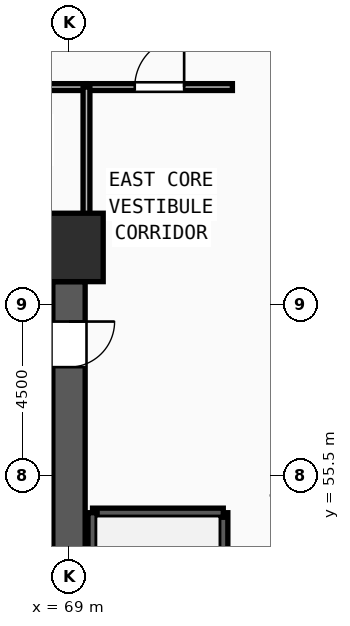
"""IFC4 building model, lengths in metres.
Left out: names, types, materials, properties, quantities, classifications, styles, units other than length and angle.
Written with IfcOpenShell. Run it as: python <this file> out.ifc"""

import sys

from ifc_helpers import new_model, si_unit, direction, frame, frame_2d, origin, origin_2d, place, context, subcontext, project, spatial, rectangle, extrude, source, transform, mapped, element, fill, save


model = new_model("IFC4")
c1 = context("Model", 3, precision=1e-05, world=origin(), true_north=direction((0.0, 1.0)))
c2 = subcontext(c1, "Body", "Model", "MODEL_VIEW")
j1 = project(units=[si_unit("LENGTHUNIT", "METRE"), si_unit("PLANEANGLEUNIT", "RADIAN")], contexts=[c1])
p1 = place(None, origin())
s1 = spatial("IfcSite", under=j1, at=p1, CompositionType="ELEMENT")
p2 = place(p1, origin())
s2 = spatial("IfcBuilding", under=s1, at=p2, CompositionType="ELEMENT")
p3 = place(p2, frame((0.0, 0.0, 23.4)))
s3 = spatial("IfcBuildingStorey", under=s2, at=p3, CompositionType="ELEMENT", Elevation=23.4)
m1 = source(origin(), c2, "Body", "SweptSolid", [
    extrude(rectangle(XDim=1.8, YDim=1.8, at=origin_2d()), origin(), (0.0, 0.0, 1.0), 5.1),
])
p4 = place(p3, frame((69.0, 61.5, 0.0), z_axis=(0.0, 0.0, 1.0), x_axis=(1.0, 0.0, 0.0)))
e1 = element("IfcColumn", 1, at=p4, inside=s3, PredefinedType="COLUMN", context=c2, shape_type="MappedRepresentation", body=[
    mapped(m1, transform((0.0, 0.0, 0.0), x_axis=(1.0, 0.0, 0.0), y_axis=(0.0, 1.0, 0.0), z_axis=(0.0, 0.0, 1.0), scale=1.0)),
])
p5 = place(p3, frame((69.0, 60.6, 0.0), z_axis=(0.0, 0.0, 1.0), x_axis=(0.0, -1.0, 0.0)))
e2 = element("IfcWall", 2, at=p5, inside=s3, PredefinedType="SHEAR", context=c2, shape_type="SweptSolid", body=[
    extrude(rectangle(XDim=13.2, YDim=0.85, at=frame_2d((6.6, 0.0))), origin(), (0.0, 0.0, 1.0), 4.82),
])
m2 = source(origin(), c2, "Body", "SweptSolid", [
    extrude(rectangle(XDim=1.2, YDim=2.2, at=frame_2d((0.6, 1.1))), frame((0.0, 0.435, 0.0), z_axis=(0.0, -1.0, 0.0), x_axis=(1.0, 0.0, 0.0)), (0.0, 0.0, 1.0), 0.87),
])
p6 = place(p5, frame((1.05, 0.0, 0.0)))
e3 = element("IfcOpeningElement", 3, at=p6, cuts=e2, PredefinedType="OPENING", context=c2, shape_type="MappedRepresentation", body=[
    mapped(m2, transform((0.0, 0.0, 0.0), x_axis=(1.0, 0.0, 0.0), y_axis=(0.0, 1.0, 0.0), z_axis=(0.0, 0.0, 1.0), scale=1.0)),
])
p7 = place(p3, frame((73.06, 46.7, 0.0), z_axis=(0.0, 0.0, 1.0), x_axis=(0.0, 1.0, 0.0)))
e4 = element("IfcWall", 4, at=p7, inside=s3, PredefinedType="SOLIDWALL", context=c2, shape_type="SweptSolid", body=[
    extrude(rectangle(XDim=7.82, YDim=0.24, at=frame_2d((3.91, 0.0))), origin(), (0.0, 0.0, 1.0), 4.82),
])
m3 = source(origin(), c2, "Body", "SweptSolid", [
    extrude(rectangle(XDim=1.2, YDim=2.2, at=frame_2d((0.6, 1.1))), frame((0.0, 0.13, 0.0), z_axis=(0.0, -1.0, 0.0), x_axis=(1.0, 0.0, 0.0)), (0.0, 0.0, 1.0), 0.26),
])
p8 = place(p7, frame((0.32, 0.0, 0.0)))
e5 = element("IfcOpeningElement", 5, at=p8, cuts=e4, PredefinedType="OPENING", context=c2, shape_type="MappedRepresentation", body=[
    mapped(m3, transform((0.0, 0.0, 0.0), x_axis=(1.0, 0.0, 0.0), y_axis=(0.0, 1.0, 0.0), z_axis=(0.0, 0.0, 1.0), scale=1.0)),
])
p9 = place(p3, frame((73.06, 54.52, 0.0), z_axis=(0.0, 0.0, 1.0), x_axis=(-1.0, 0.0, 0.0)))
e6 = element("IfcWall", 6, at=p9, inside=s3, PredefinedType="SOLIDWALL", context=c2, shape_type="SweptSolid", body=[
    extrude(rectangle(XDim=3.44, YDim=0.24, at=frame_2d((1.72, 0.0))), origin(), (0.0, 0.0, 1.0), 4.82),
])
p10 = place(p3, frame((69.62, 54.52, 0.0), z_axis=(0.0, 0.0, 1.0), x_axis=(0.0, -1.0, 0.0)))
e7 = element("IfcWall", 7, at=p10, inside=s3, PredefinedType="SOLIDWALL", context=c2, shape_type="SweptSolid", body=[
    extrude(rectangle(XDim=7.82, YDim=0.24, at=frame_2d((3.91, 0.0))), origin(), (0.0, 0.0, 1.0), 4.82),
])
p11 = place(p3, frame((65.92, 65.72, 0.0), z_axis=(0.0, 0.0, 1.0), x_axis=(1.0, 0.0, 0.0)))
e8 = element("IfcWall", 8, at=p11, inside=s3, PredefinedType="PARTITIONING", context=c2, shape_type="SweptSolid", body=[
    extrude(rectangle(XDim=3.54, YDim=0.18, at=frame_2d((1.77, 0.0))), origin(), (0.0, 0.0, 1.0), 4.82),
])
m4 = source(origin(), c2, "Body", "SweptSolid", [
    extrude(rectangle(XDim=1.0, YDim=2.2, at=frame_2d((0.5, 1.1))), frame((0.0, 0.1, 0.0), z_axis=(0.0, -1.0, 0.0), x_axis=(1.0, 0.0, 0.0)), (0.0, 0.0, 1.0), 0.2),
])
p12 = place(p11, frame((1.27, 0.0, 0.0)))
e9 = element("IfcOpeningElement", 9, at=p12, cuts=e8, PredefinedType="OPENING", context=c2, shape_type="MappedRepresentation", body=[
    mapped(m4, transform((0.0, 0.0, 0.0), x_axis=(1.0, 0.0, 0.0), y_axis=(0.0, 1.0, 0.0), z_axis=(0.0, 0.0, 1.0), scale=1.0)),
])
p13 = place(p3, frame((69.46, 65.72, 0.0), z_axis=(0.0, 0.0, 1.0), x_axis=(1.0, 0.0, 0.0)))
e10 = element("IfcWall", 10, at=p13, inside=s3, PredefinedType="PARTITIONING", context=c2, shape_type="SweptSolid", body=[
    extrude(rectangle(XDim=3.84, YDim=0.18, at=frame_2d((1.92, 0.0))), origin(), (0.0, 0.0, 1.0), 4.82),
])
m5 = source(origin(), c2, "Body", "SweptSolid", [
    extrude(rectangle(XDim=1.3, YDim=2.2, at=frame_2d((0.65, 1.1))), frame((0.0, 0.1, 0.0), z_axis=(0.0, -1.0, 0.0), x_axis=(1.0, 0.0, 0.0)), (0.0, 0.0, 1.0), 0.2),
])
p14 = place(p13, frame((1.27, 0.0, 0.0)))
e11 = element("IfcOpeningElement", 11, at=p14, cuts=e10, PredefinedType="OPENING", context=c2, shape_type="MappedRepresentation", body=[
    mapped(m5, transform((0.0, 0.0, 0.0), x_axis=(1.0, 0.0, 0.0), y_axis=(0.0, 1.0, 0.0), z_axis=(0.0, 0.0, 1.0), scale=1.0)),
])
p15 = place(p3, frame((69.46, 61.95, 0.0), z_axis=(0.0, 0.0, 1.0), x_axis=(0.0, 1.0, 0.0)))
e12 = element("IfcWall", 12, at=p15, inside=s3, PredefinedType="PARTITIONING", context=c2, shape_type="SweptSolid", body=[
    extrude(rectangle(XDim=3.77, YDim=0.18, at=frame_2d((1.885, 0.0))), origin(), (0.0, 0.0, 1.0), 3.335),
])
m6 = source(origin(), c2, "Body", "SweptSolid", [
    extrude(rectangle(XDim=1.2, YDim=2.2, at=frame_2d((0.6, 1.1))), frame((0.0, 0.025, 0.0), z_axis=(0.0, -1.0, 0.0), x_axis=(1.0, 0.0, 0.0)), (0.0, 0.0, 1.0), 0.05),
])
p16 = place(p6, origin())
e13 = element("IfcDoor", 13, at=p16, inside=s3, OperationType="SINGLE_SWING_LEFT", PredefinedType="DOOR", context=c2, shape_type="MappedRepresentation", body=[
    mapped(m6, transform((0.0, 0.0, 0.0), x_axis=(1.0, 0.0, 0.0), y_axis=(0.0, 1.0, 0.0), z_axis=(0.0, 0.0, 1.0), scale=1.0)),
])
fill(e3, e13)
m7 = source(origin(), c2, "Body", "SweptSolid", [
    extrude(rectangle(XDim=1.3, YDim=2.2, at=frame_2d((0.65, 1.1))), frame((0.0, 0.025, 0.0), z_axis=(0.0, -1.0, 0.0), x_axis=(1.0, 0.0, 0.0)), (0.0, 0.0, 1.0), 0.05),
])
p17 = place(p14, origin())
e14 = element("IfcDoor", 14, at=p17, inside=s3, OperationType="SINGLE_SWING_RIGHT", PredefinedType="DOOR", context=c2, shape_type="MappedRepresentation", body=[
    mapped(m7, transform((0.0, 0.0, 0.0), x_axis=(1.0, 0.0, 0.0), y_axis=(0.0, 1.0, 0.0), z_axis=(0.0, 0.0, 1.0), scale=1.0)),
])
fill(e11, e14)
save(model, sys.argv[1])
